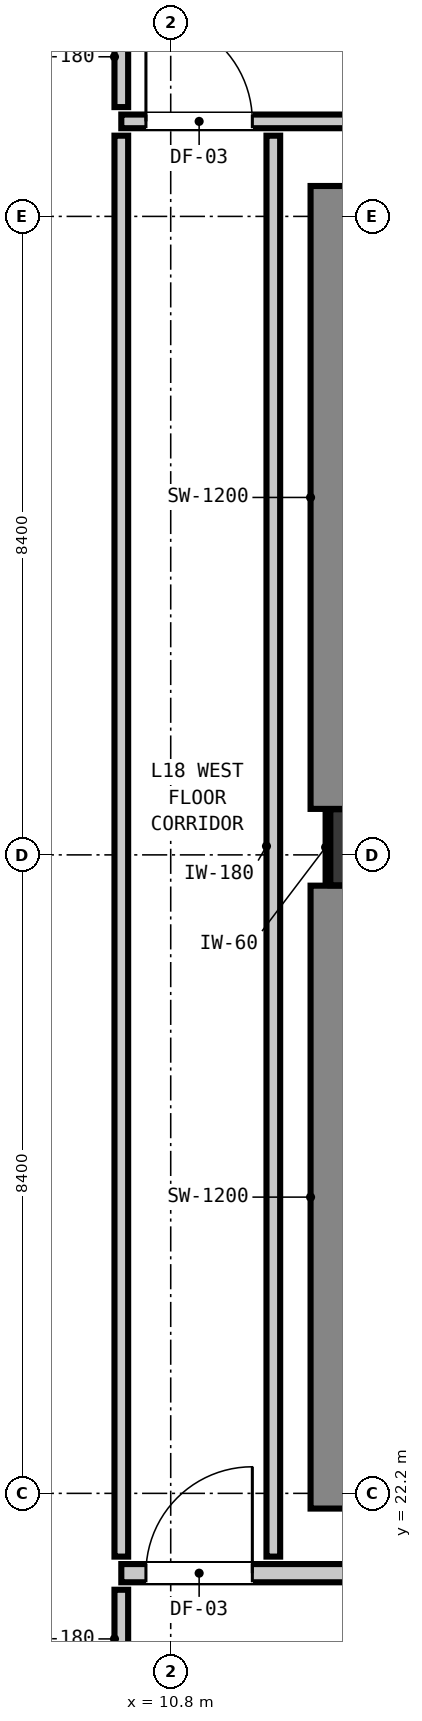
"""IFC4 building model, lengths in metres.
Left out: names, types, materials, properties, quantities, classifications, styles, units other than length and angle.
Written with IfcOpenShell. Run it as: python <this file> out.ifc"""

import sys

from ifc_helpers import new_model, si_unit, direction, frame, frame_2d, origin, origin_2d, place, context, subcontext, project, spatial, rectangle, extrude, element, fill, save


model = new_model("IFC4")
c1 = context("Model", 3, precision=1e-05, world=origin(), true_north=direction((0.0, 1.0)))
c2 = subcontext(c1, "Body", "Model", "MODEL_VIEW")
j1 = project(units=[si_unit("LENGTHUNIT", "METRE"), si_unit("PLANEANGLEUNIT", "RADIAN")], contexts=[c1])
p1 = place(None, origin())
s1 = spatial("IfcSite", under=j1, at=p1, CompositionType="ELEMENT")
p2 = place(p1, origin())
s2 = spatial("IfcBuilding", under=s1, at=p2, CompositionType="ELEMENT")
p3 = place(p2, frame((0.0, 0.0, 65.16)))
s3 = spatial("IfcBuildingStorey", under=s2, at=p3, CompositionType="ELEMENT", Elevation=65.16)
p4 = place(p3, frame((13.4, 30.7, 0.0), z_axis=(0.0, 0.0, 1.0), x_axis=(1.0, 0.0, 0.0)))
e1 = element("IfcColumn", 1, at=p4, inside=s3, PredefinedType="COLUMN", context=c2, shape_type="SweptSolid", body=[
    extrude(rectangle(XDim=1.0, YDim=1.0, at=origin_2d()), origin(), (0.0, 0.0, 1.0), 3.32),
])
p5 = place(p3, frame((13.24, 22.0, 0.0), z_axis=(0.0, 0.0, 1.0), x_axis=(0.0, 1.0, 0.0)))
e2 = element("IfcWall", 2, at=p5, inside=s3, PredefinedType="SHEAR", context=c2, shape_type="SweptSolid", body=[
    extrude(rectangle(XDim=8.195, YDim=1.2, at=frame_2d((4.098, 0.0))), origin(), (0.0, 0.0, 1.0), 3.32),
])
p6 = place(p3, frame((13.24, 31.205, 0.0), z_axis=(0.0, 0.0, 1.0), x_axis=(0.0, 1.0, 0.0)))
e3 = element("IfcWall", 3, at=p6, inside=s3, PredefinedType="SHEAR", context=c2, shape_type="SweptSolid", body=[
    extrude(rectangle(XDim=8.195, YDim=1.2, at=frame_2d((4.097, 0.0))), origin(), (0.0, 0.0, 1.0), 3.32),
])
p7 = place(p3, frame((10.15, 21.15, 0.0), z_axis=(0.0, 0.0, 1.0), x_axis=(1.0, 0.0, 0.0)))
e4 = element("IfcWall", 4, at=p7, inside=s3, PredefinedType="PARTITIONING", context=c2, shape_type="SweptSolid", body=[
    extrude(rectangle(XDim=26.779, YDim=0.24, at=frame_2d((13.39, 0.0))), origin(), (0.0, 0.0, 1.0), 3.06),
])
p8 = place(p7, frame((8.06, 0.0, 0.0)))
e5 = element("IfcOpeningElement", 5, at=p8, cuts=e4, PredefinedType="OPENING", context=c2, shape_type="SweptSolid", body=[
    extrude(rectangle(XDim=1.1, YDim=2.15, at=frame_2d((0.55, 1.075))), frame((0.0, 0.13, 0.0), z_axis=(0.0, -1.0, 0.0), x_axis=(1.0, 0.0, 0.0)), (0.0, 0.0, 1.0), 0.26),
])
p9 = place(p7, frame((0.324, 0.0, 0.0)))
e6 = element("IfcOpeningElement", 6, at=p9, cuts=e4, PredefinedType="OPENING", context=c2, shape_type="SweptSolid", body=[
    extrude(rectangle(XDim=1.4, YDim=2.15, at=frame_2d((0.7, 1.075))), frame((0.0, 0.13, 0.0), z_axis=(0.0, -1.0, 0.0), x_axis=(1.0, 0.0, 0.0)), (0.0, 0.0, 1.0), 0.26),
])
p10 = place(p3, frame((10.15, 40.25, 0.0), z_axis=(0.0, 0.0, 1.0), x_axis=(1.0, 0.0, 0.0)))
e7 = element("IfcWall", 7, at=p10, inside=s3, PredefinedType="PARTITIONING", context=c2, shape_type="SweptSolid", body=[
    extrude(rectangle(XDim=40.023, YDim=0.18, at=frame_2d((20.012, 0.0))), origin(), (0.0, 0.0, 1.0), 3.06),
])
p11 = place(p10, frame((7.285, 0.0, 0.0)))
e8 = element("IfcOpeningElement", 8, at=p11, cuts=e7, PredefinedType="OPENING", context=c2, shape_type="SweptSolid", body=[
    extrude(rectangle(XDim=1.4, YDim=2.15, at=frame_2d((0.7, 1.075))), frame((0.0, 0.1, 0.0), z_axis=(0.0, -1.0, 0.0), x_axis=(1.0, 0.0, 0.0)), (0.0, 0.0, 1.0), 0.2),
])
p12 = place(p10, frame((0.324, 0.0, 0.0)))
e9 = element("IfcOpeningElement", 9, at=p12, cuts=e7, PredefinedType="OPENING", context=c2, shape_type="SweptSolid", body=[
    extrude(rectangle(XDim=1.4, YDim=2.15, at=frame_2d((0.7, 1.075))), frame((0.0, 0.1, 0.0), z_axis=(0.0, -1.0, 0.0), x_axis=(1.0, 0.0, 0.0)), (0.0, 0.0, 1.0), 0.2),
])
p13 = place(p10, frame((31.825, 0.0, 0.0)))
e10 = element("IfcOpeningElement", 10, at=p13, cuts=e7, PredefinedType="OPENING", context=c2, shape_type="SweptSolid", body=[
    extrude(rectangle(XDim=1.0, YDim=2.15, at=frame_2d((0.5, 1.075))), frame((0.0, 0.1, 0.0), z_axis=(0.0, -1.0, 0.0), x_axis=(1.0, 0.0, 0.0)), (0.0, 0.0, 1.0), 0.2),
])
p14 = place(p3, frame((10.15, 19.638, 0.0), z_axis=(0.0, 0.0, 1.0), x_axis=(0.0, 1.0, 0.0)))
e11 = element("IfcWall", 11, at=p14, inside=s3, PredefinedType="PARTITIONING", context=c2, shape_type="SweptSolid", body=[
    extrude(rectangle(XDim=1.294, YDim=0.18, at=frame_2d((0.647, 0.0))), origin(), (0.0, 0.0, 1.0), 2.445),
])
p15 = place(p3, frame((10.15, 21.368, 0.0), z_axis=(0.0, 0.0, 1.0), x_axis=(0.0, 1.0, 0.0)))
e12 = element("IfcWall", 12, at=p15, inside=s3, PredefinedType="PARTITIONING", context=c2, shape_type="SweptSolid", body=[
    extrude(rectangle(XDim=18.694, YDim=0.18, at=frame_2d((9.347, 0.0))), origin(), (0.0, 0.0, 1.0), 3.06),
])
p16 = place(p3, frame((10.15, 40.438, 0.0), z_axis=(0.0, 0.0, 1.0), x_axis=(0.0, 1.0, 0.0)))
e13 = element("IfcWall", 13, at=p16, inside=s3, PredefinedType="PARTITIONING", context=c2, shape_type="SweptSolid", body=[
    extrude(rectangle(XDim=1.324, YDim=0.18, at=frame_2d((0.662, 0.0))), origin(), (0.0, 0.0, 1.0), 3.06),
])
p17 = place(p3, frame((12.15, 21.368, 0.0), z_axis=(0.0, 0.0, 1.0), x_axis=(0.0, 1.0, 0.0)))
e14 = element("IfcWall", 14, at=p17, inside=s3, PredefinedType="PARTITIONING", context=c2, shape_type="SweptSolid", body=[
    extrude(rectangle(XDim=18.694, YDim=0.18, at=frame_2d((9.347, 0.0))), origin(), (0.0, 0.0, 1.0), 3.06),
])
p18 = place(p3, frame((12.868, 30.21, 0.0), z_axis=(0.0, 0.0, 1.0), x_axis=(0.0, 1.0, 0.0)))
e15 = element("IfcWall", 15, at=p18, inside=s3, PredefinedType="PARTITIONING", context=c2, shape_type="SweptSolid", body=[
    extrude(rectangle(XDim=0.98, YDim=0.06, at=frame_2d((0.49, 0.0))), origin(), (0.0, 0.0, 1.0), 1.45),
])
p19 = place(p9, origin())
e16 = element("IfcDoor", 16, at=p19, inside=s3, OperationType="SINGLE_SWING_RIGHT", PredefinedType="DOOR", context=c2, shape_type="SweptSolid", body=[
    extrude(rectangle(XDim=1.4, YDim=2.15, at=frame_2d((0.7, 1.075))), frame((0.0, 0.025, 0.0), z_axis=(0.0, -1.0, 0.0), x_axis=(1.0, 0.0, 0.0)), (0.0, 0.0, 1.0), 0.05),
])
fill(e6, e16)
p20 = place(p12, origin())
e17 = element("IfcDoor", 17, at=p20, inside=s3, OperationType="SINGLE_SWING_LEFT", PredefinedType="DOOR", context=c2, shape_type="SweptSolid", body=[
    extrude(rectangle(XDim=1.4, YDim=2.15, at=frame_2d((0.7, 1.075))), frame((0.0, 0.025, 0.0), z_axis=(0.0, -1.0, 0.0), x_axis=(1.0, 0.0, 0.0)), (0.0, 0.0, 1.0), 0.05),
])
fill(e9, e17)
save(model, sys.argv[1])
